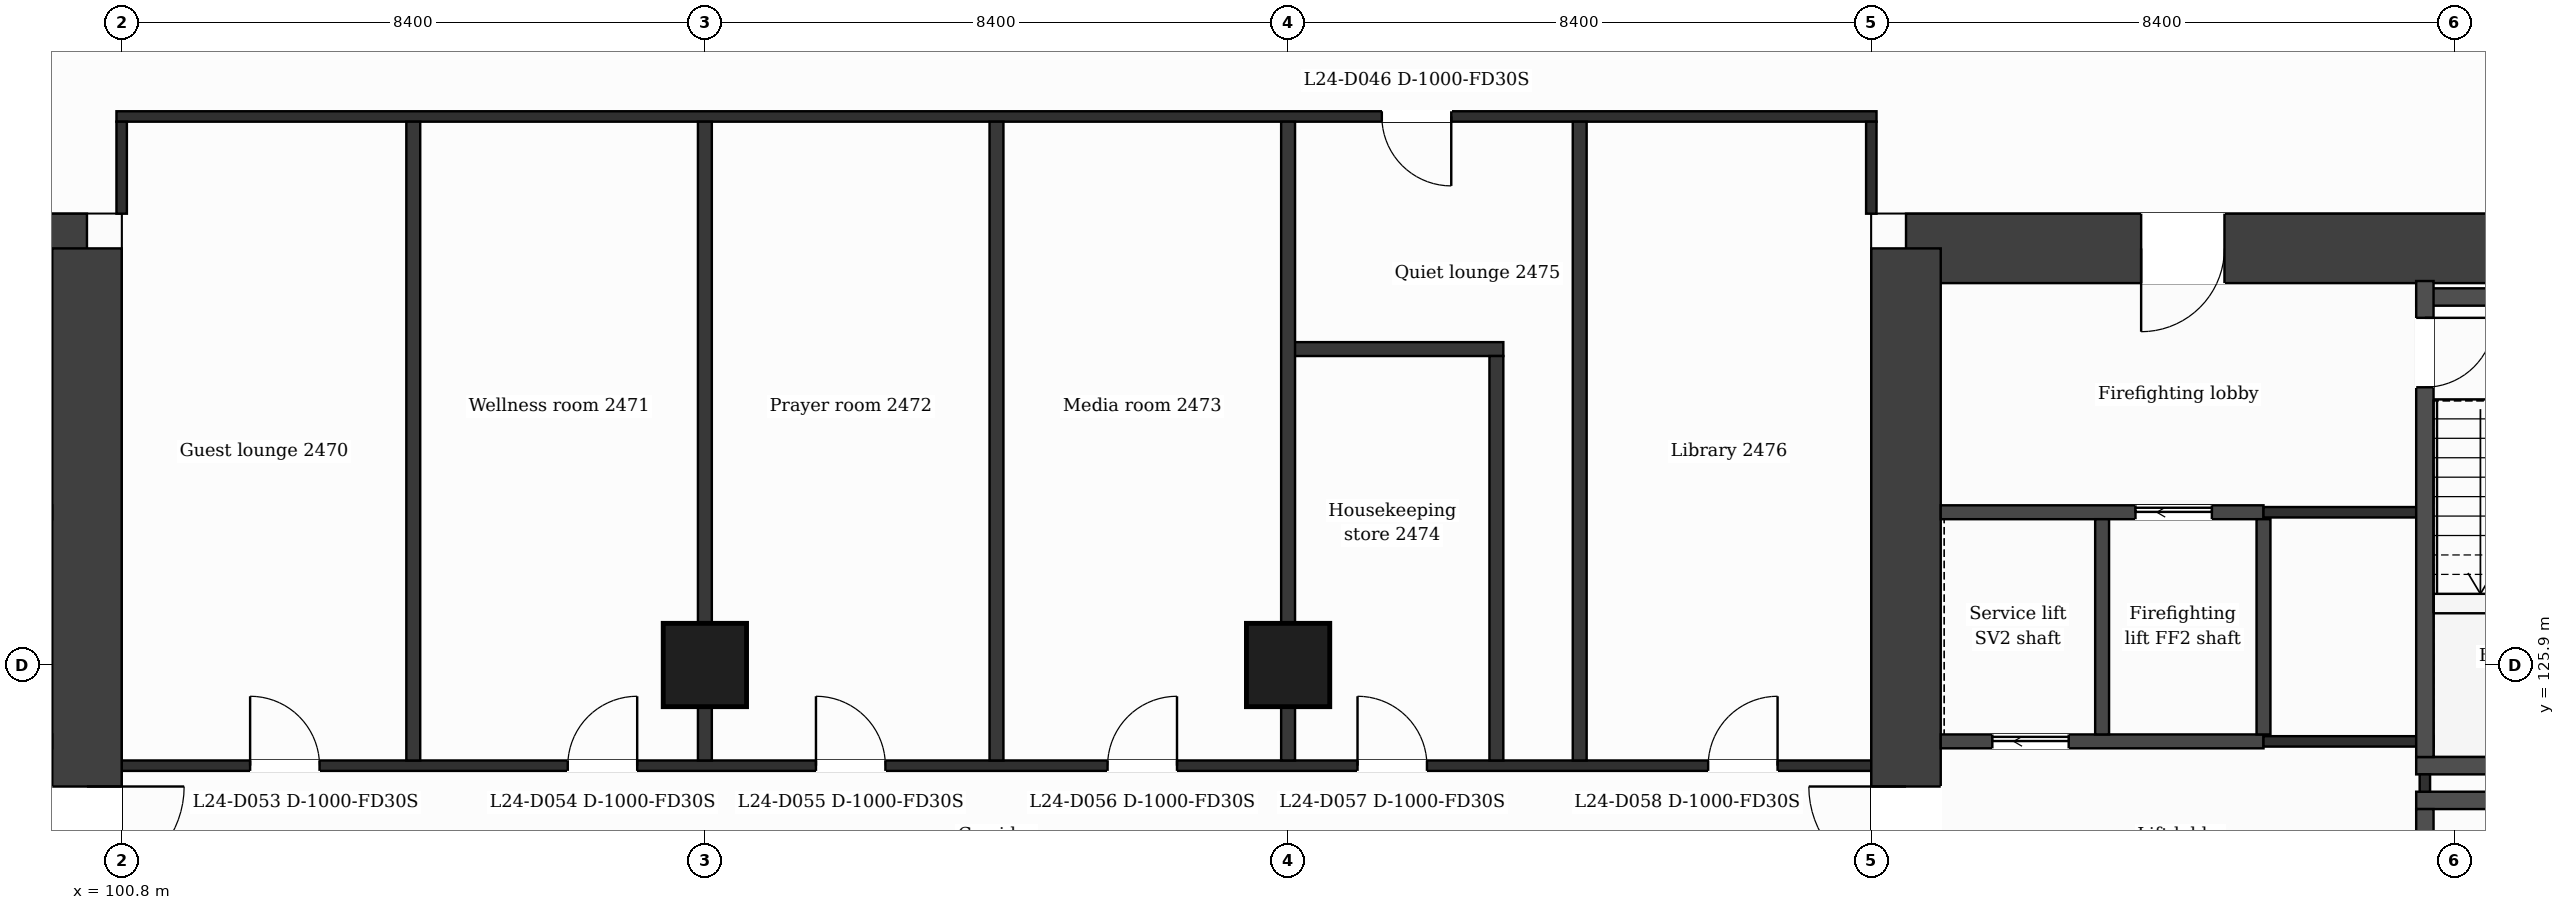
"""IFC4 building model, lengths in metres.
Left out: names, types, materials, properties, quantities, classifications, styles, units other than length and angle.
Written with IfcOpenShell. Run it as: python <this file> out.ifc"""

import sys

from ifc_helpers import new_model, si_unit, direction, frame, frame_2d, origin, origin_2d, place, context, subcontext, project, spatial, rectangle, extrude, element, fill, save


model = new_model("IFC4")
c1 = context("Model", 3, precision=1e-05, world=origin(), true_north=direction((0.0, 1.0)))
c2 = subcontext(c1, "Body", "Model", "MODEL_VIEW")
j1 = project(units=[si_unit("LENGTHUNIT", "METRE"), si_unit("PLANEANGLEUNIT", "RADIAN")], contexts=[c1])
p1 = place(None, origin())
s1 = spatial("IfcSite", under=j1, at=p1, CompositionType="ELEMENT")
p2 = place(p1, origin())
s2 = spatial("IfcBuilding", under=s1, at=p2, CompositionType="ELEMENT")
p3 = place(p2, frame((0.0, 0.0, 105.8)))
s3 = spatial("IfcBuildingStorey", under=s2, at=p3, CompositionType="ELEMENT", Elevation=105.8)
p4 = place(p3, frame((89.068, 131.9, 0.0), z_axis=(0.0, 0.0, 1.0), x_axis=(1.0, 0.0, 0.0)))
e1 = element("IfcWall", 1, at=p4, inside=s3, PredefinedType="SHEAR", context=c2, shape_type="SweptSolid", body=[
    extrude(rectangle(XDim=11.232, YDim=1.0, at=frame_2d((5.616, 0.0))), origin(), (0.0, 0.0, 1.0), 3.7),
])
p5 = place(p4, frame((6.646, 0.0, 0.0)))
e2 = element("IfcOpeningElement", 2, at=p5, cuts=e1, PredefinedType="OPENING", context=c2, shape_type="SweptSolid", body=[
    extrude(rectangle(XDim=1.2, YDim=2.1, at=frame_2d((0.6, 1.05))), frame((0.0, 0.51, 0.0), z_axis=(0.0, -1.0, 0.0), x_axis=(1.0, 0.0, 0.0)), (0.0, 0.0, 1.0), 1.02),
])
p6 = place(p3, frame((100.3, 131.9, 0.0), z_axis=(0.0, 0.0, 1.0), x_axis=(0.0, -1.0, 0.0)))
e3 = element("IfcWall", 3, at=p6, inside=s3, PredefinedType="SHEAR", context=c2, shape_type="SweptSolid", body=[
    extrude(rectangle(XDim=21.0, YDim=1.0, at=frame_2d((10.5, 0.0))), origin(), (0.0, 0.0, 1.0), 3.7),
])
p7 = place(p6, frame((7.75, 0.0, 0.0)))
e4 = element("IfcOpeningElement", 4, at=p7, cuts=e3, PredefinedType="OPENING", context=c2, shape_type="SweptSolid", body=[
    extrude(rectangle(XDim=1.4, YDim=2.1, at=frame_2d((0.7, 1.05))), frame((0.0, 0.51, 0.0), z_axis=(0.0, -1.0, 0.0), x_axis=(1.0, 0.0, 0.0)), (0.0, 0.0, 1.0), 1.02),
])
p8 = place(p3, frame((126.5, 131.9, 0.0), z_axis=(0.0, 0.0, 1.0), x_axis=(1.0, 0.0, 0.0)))
e5 = element("IfcWall", 5, at=p8, inside=s3, PredefinedType="SHEAR", context=c2, shape_type="SweptSolid", body=[
    extrude(rectangle(XDim=11.232, YDim=1.0, at=frame_2d((5.616, 0.0))), origin(), (0.0, 0.0, 1.0), 3.7),
])
p9 = place(p8, frame((3.386, 0.0, 0.0)))
e6 = element("IfcOpeningElement", 6, at=p9, cuts=e5, PredefinedType="OPENING", context=c2, shape_type="SweptSolid", body=[
    extrude(rectangle(XDim=1.2, YDim=2.1, at=frame_2d((0.6, 1.05))), frame((0.0, 0.51, 0.0), z_axis=(0.0, -1.0, 0.0), x_axis=(1.0, 0.0, 0.0)), (0.0, 0.0, 1.0), 1.02),
])
p10 = place(p3, frame((126.5, 110.9, 0.0), z_axis=(0.0, 0.0, 1.0), x_axis=(0.0, 1.0, 0.0)))
e7 = element("IfcWall", 7, at=p10, inside=s3, PredefinedType="SHEAR", context=c2, shape_type="SweptSolid", body=[
    extrude(rectangle(XDim=21.0, YDim=1.0, at=frame_2d((10.5, 0.0))), origin(), (0.0, 0.0, 1.0), 3.7),
])
p11 = place(p10, frame((11.85, 0.0, 0.0)))
e8 = element("IfcOpeningElement", 8, at=p11, cuts=e7, PredefinedType="OPENING", context=c2, shape_type="SweptSolid", body=[
    extrude(rectangle(XDim=1.4, YDim=2.1, at=frame_2d((0.7, 1.05))), frame((0.0, 0.51, 0.0), z_axis=(0.0, -1.0, 0.0), x_axis=(1.0, 0.0, 0.0)), (0.0, 0.0, 1.0), 1.02),
])
for number, where, z_axis, x_axis in (
    (9, (109.2, 125.9, 0.0), (0.0, 0.0, 1.0), (1.0, 0.0, 0.0)),
    (10, (117.6, 125.9, 0.0), (0.0, 0.0, 1.0), (1.0, 0.0, 0.0)),
):
    element("IfcColumn", number, at=place(p3, frame(where, z_axis=z_axis, x_axis=x_axis)), inside=s3, PredefinedType="COLUMN", context=c2, shape_type="SweptSolid", body=[
        extrude(rectangle(XDim=1.2, YDim=1.2, at=origin_2d()), origin(), (0.0, 0.0, 1.0), 3.7),
    ])
for number, where, z_axis, x_axis in (
    (11, (133.848, 123.95, 0.0), (0.0, 0.0, 1.0), (1.0, 0.0, 0.0)),
    (12, (133.848, 124.45, 0.0), (0.0, 0.0, 1.0), (1.0, 0.0, 0.0)),
):
    element("IfcWall", number, at=place(p3, frame(where, z_axis=z_axis, x_axis=x_axis)), inside=s3, PredefinedType="PARTITIONING", context=c2, shape_type="SweptSolid", body=[
        extrude(rectangle(XDim=3.4, YDim=0.25, at=frame_2d((1.7, 0.0))), origin(), (0.0, 0.0, 1.0), 3.38),
    ])
p12 = place(p3, frame((100.8, 124.45, 0.0), z_axis=(0.0, 0.0, 1.0), x_axis=(1.0, 0.0, 0.0)))
e13 = element("IfcWall", 13, at=p12, inside=s3, PredefinedType="PARTITIONING", context=c2, shape_type="SweptSolid", body=[
    extrude(rectangle(XDim=25.2, YDim=0.15, at=frame_2d((12.6, 0.0))), origin(), (0.0, 0.0, 1.0), 3.38),
])
p13 = place(p12, frame((1.85, 0.0, 0.0)))
e14 = element("IfcOpeningElement", 14, at=p13, cuts=e13, PredefinedType="OPENING", context=c2, shape_type="SweptSolid", body=[
    extrude(rectangle(XDim=1.0, YDim=2.1, at=frame_2d((0.5, 1.05))), frame((0.0, 0.085, 0.0), z_axis=(0.0, -1.0, 0.0), x_axis=(1.0, 0.0, 0.0)), (0.0, 0.0, 1.0), 0.17),
])
p14 = place(p12, frame((6.425, 0.0, 0.0)))
e15 = element("IfcOpeningElement", 15, at=p14, cuts=e13, PredefinedType="OPENING", context=c2, shape_type="SweptSolid", body=[
    extrude(rectangle(XDim=1.0, YDim=2.1, at=frame_2d((0.5, 1.05))), frame((0.0, 0.085, 0.0), z_axis=(0.0, -1.0, 0.0), x_axis=(1.0, 0.0, 0.0)), (0.0, 0.0, 1.0), 0.17),
])
p15 = place(p12, frame((10.0, 0.0, 0.0)))
e16 = element("IfcOpeningElement", 16, at=p15, cuts=e13, PredefinedType="OPENING", context=c2, shape_type="SweptSolid", body=[
    extrude(rectangle(XDim=1.0, YDim=2.1, at=frame_2d((0.5, 1.05))), frame((0.0, 0.085, 0.0), z_axis=(0.0, -1.0, 0.0), x_axis=(1.0, 0.0, 0.0)), (0.0, 0.0, 1.0), 0.17),
])
p16 = place(p12, frame((14.2, 0.0, 0.0)))
e17 = element("IfcOpeningElement", 17, at=p16, cuts=e13, PredefinedType="OPENING", context=c2, shape_type="SweptSolid", body=[
    extrude(rectangle(XDim=1.0, YDim=2.1, at=frame_2d((0.5, 1.05))), frame((0.0, 0.085, 0.0), z_axis=(0.0, -1.0, 0.0), x_axis=(1.0, 0.0, 0.0)), (0.0, 0.0, 1.0), 0.17),
])
p17 = place(p12, frame((17.8, 0.0, 0.0)))
e18 = element("IfcOpeningElement", 18, at=p17, cuts=e13, PredefinedType="OPENING", context=c2, shape_type="SweptSolid", body=[
    extrude(rectangle(XDim=1.0, YDim=2.1, at=frame_2d((0.5, 1.05))), frame((0.0, 0.085, 0.0), z_axis=(0.0, -1.0, 0.0), x_axis=(1.0, 0.0, 0.0)), (0.0, 0.0, 1.0), 0.17),
])
p18 = place(p12, frame((22.85, 0.0, 0.0)))
e19 = element("IfcOpeningElement", 19, at=p18, cuts=e13, PredefinedType="OPENING", context=c2, shape_type="SweptSolid", body=[
    extrude(rectangle(XDim=1.0, YDim=2.1, at=frame_2d((0.5, 1.05))), frame((0.0, 0.085, 0.0), z_axis=(0.0, -1.0, 0.0), x_axis=(1.0, 0.0, 0.0)), (0.0, 0.0, 1.0), 0.17),
])
p19 = place(p3, frame((127.0, 124.8, 0.0), z_axis=(0.0, 0.0, 1.0), x_axis=(1.0, 0.0, 0.0)))
e20 = element("IfcWall", 20, at=p19, inside=s3, PredefinedType="PARTITIONING", context=c2, shape_type="SweptSolid", body=[
    extrude(rectangle(XDim=4.649, YDim=0.2, at=frame_2d((2.324, 0.0))), origin(), (0.0, 0.0, 1.0), 3.38),
])
p20 = place(p19, frame((0.743, 0.0, 0.0)))
e21 = element("IfcOpeningElement", 21, at=p20, cuts=e20, PredefinedType="OPENING", context=c2, shape_type="SweptSolid", body=[
    extrude(rectangle(XDim=1.1, YDim=2.1, at=frame_2d((0.55, 1.05))), frame((0.0, 0.11, 0.0), z_axis=(0.0, -1.0, 0.0), x_axis=(1.0, 0.0, 0.0)), (0.0, 0.0, 1.0), 0.22),
])
p21 = place(p3, frame((131.649, 124.8, 0.0), z_axis=(0.0, 0.0, 1.0), x_axis=(1.0, 0.0, 0.0)))
e22 = element("IfcWall", 22, at=p21, inside=s3, PredefinedType="PARTITIONING", context=c2, shape_type="SweptSolid", body=[
    extrude(rectangle(XDim=2.449, YDim=0.15, at=frame_2d((1.225, 0.0))), origin(), (0.0, 0.0, 1.0), 3.38),
])
p22 = place(p3, frame((127.0, 128.1, 0.0), z_axis=(0.0, 0.0, 1.0), x_axis=(1.0, 0.0, 0.0)))
e23 = element("IfcWall", 23, at=p22, inside=s3, PredefinedType="PARTITIONING", context=c2, shape_type="SweptSolid", body=[
    extrude(rectangle(XDim=4.649, YDim=0.2, at=frame_2d((2.324, 0.0))), origin(), (0.0, 0.0, 1.0), 3.38),
])
p23 = place(p22, frame((2.805, 0.0, 0.0)))
e24 = element("IfcOpeningElement", 24, at=p23, cuts=e23, PredefinedType="OPENING", context=c2, shape_type="SweptSolid", body=[
    extrude(rectangle(XDim=1.1, YDim=2.1, at=frame_2d((0.55, 1.05))), frame((0.0, 0.11, 0.0), z_axis=(0.0, -1.0, 0.0), x_axis=(1.0, 0.0, 0.0)), (0.0, 0.0, 1.0), 0.22),
])
p24 = place(p3, frame((131.649, 128.1, 0.0), z_axis=(0.0, 0.0, 1.0), x_axis=(1.0, 0.0, 0.0)))
e25 = element("IfcWall", 25, at=p24, inside=s3, PredefinedType="PARTITIONING", context=c2, shape_type="SweptSolid", body=[
    extrude(rectangle(XDim=2.324, YDim=0.15, at=frame_2d((1.162, 0.0))), origin(), (0.0, 0.0, 1.0), 3.38),
])
p25 = place(p3, frame((117.6, 130.45, 0.0), z_axis=(0.0, 0.0, 1.0), x_axis=(1.0, 0.0, 0.0)))
e26 = element("IfcWall", 26, at=p25, inside=s3, PredefinedType="PARTITIONING", context=c2, shape_type="SweptSolid", body=[
    extrude(rectangle(XDim=3.1, YDim=0.2, at=frame_2d((1.55, 0.0))), origin(), (0.0, 0.0, 1.0), 3.38),
])
p26 = place(p3, frame((133.848, 131.2, 0.0), z_axis=(0.0, 0.0, 1.0), x_axis=(1.0, 0.0, 0.0)))
e27 = element("IfcWall", 27, at=p26, inside=s3, PredefinedType="PARTITIONING", context=c2, shape_type="SweptSolid", body=[
    extrude(rectangle(XDim=3.504, YDim=0.25, at=frame_2d((1.752, 0.0))), origin(), (0.0, 0.0, 1.0), 3.38),
])
p27 = place(p3, frame((100.725, 133.8, 0.0), z_axis=(0.0, 0.0, 1.0), x_axis=(1.0, 0.0, 0.0)))
e28 = element("IfcWall", 28, at=p27, inside=s3, PredefinedType="PARTITIONING", context=c2, shape_type="SweptSolid", body=[
    extrude(rectangle(XDim=25.35, YDim=0.15, at=frame_2d((12.675, 0.0))), origin(), (0.0, 0.0, 1.0), 3.38),
])
p28 = place(p27, frame((18.225, 0.0, 0.0)))
e29 = element("IfcOpeningElement", 29, at=p28, cuts=e28, PredefinedType="OPENING", context=c2, shape_type="SweptSolid", body=[
    extrude(rectangle(XDim=1.0, YDim=2.1, at=frame_2d((0.5, 1.05))), frame((0.0, 0.085, 0.0), z_axis=(0.0, -1.0, 0.0), x_axis=(1.0, 0.0, 0.0)), (0.0, 0.0, 1.0), 0.17),
])
p29 = place(p3, frame((100.8, 132.4, 0.0), z_axis=(0.0, 0.0, 1.0), x_axis=(0.0, 1.0, 0.0)))
e30 = element("IfcWall", 30, at=p29, inside=s3, PredefinedType="PARTITIONING", context=c2, shape_type="SweptSolid", body=[
    extrude(rectangle(XDim=1.325, YDim=0.15, at=frame_2d((0.663, 0.0))), origin(), (0.0, 0.0, 1.0), 3.38),
])
for number, where, z_axis, x_axis in (
    (31, (105.0, 124.525, 0.0), (0.0, 0.0, 1.0), (0.0, 1.0, 0.0)),
    (32, (109.2, 124.525, 0.0), (0.0, 0.0, 1.0), (0.0, 1.0, 0.0)),
    (33, (113.4, 124.525, 0.0), (0.0, 0.0, 1.0), (0.0, 1.0, 0.0)),
    (34, (117.6, 124.525, 0.0), (0.0, 0.0, 1.0), (0.0, 1.0, 0.0)),
):
    element("IfcWall", number, at=place(p3, frame(where, z_axis=z_axis, x_axis=x_axis)), inside=s3, PredefinedType="PARTITIONING", context=c2, shape_type="SweptSolid", body=[
        extrude(rectangle(XDim=9.2, YDim=0.2, at=frame_2d((4.6, 0.0))), origin(), (0.0, 0.0, 1.0), 3.38),
    ])
p30 = place(p3, frame((120.6, 124.525, 0.0), z_axis=(0.0, 0.0, 1.0), x_axis=(0.0, 1.0, 0.0)))
e35 = element("IfcWall", 35, at=p30, inside=s3, PredefinedType="PARTITIONING", context=c2, shape_type="SweptSolid", body=[
    extrude(rectangle(XDim=5.825, YDim=0.2, at=frame_2d((2.913, 0.0))), origin(), (0.0, 0.0, 1.0), 3.38),
])
p31 = place(p3, frame((121.8, 124.525, 0.0), z_axis=(0.0, 0.0, 1.0), x_axis=(0.0, 1.0, 0.0)))
e36 = element("IfcWall", 36, at=p31, inside=s3, PredefinedType="PARTITIONING", context=c2, shape_type="SweptSolid", body=[
    extrude(rectangle(XDim=9.2, YDim=0.2, at=frame_2d((4.6, 0.0))), origin(), (0.0, 0.0, 1.0), 3.38),
])
p32 = place(p3, frame((126.0, 132.4, 0.0), z_axis=(0.0, 0.0, 1.0), x_axis=(0.0, 1.0, 0.0)))
e37 = element("IfcWall", 37, at=p32, inside=s3, PredefinedType="PARTITIONING", context=c2, shape_type="SweptSolid", body=[
    extrude(rectangle(XDim=1.325, YDim=0.15, at=frame_2d((0.663, 0.0))), origin(), (0.0, 0.0, 1.0), 3.38),
])
for number, where, z_axis, x_axis in (
    (38, (129.324, 124.9, 0.0), (0.0, 0.0, 1.0), (0.0, 1.0, 0.0)),
    (39, (131.649, 124.9, 0.0), (0.0, 0.0, 1.0), (0.0, 1.0, 0.0)),
):
    element("IfcWall", number, at=place(p3, frame(where, z_axis=z_axis, x_axis=x_axis)), inside=s3, PredefinedType="PARTITIONING", context=c2, shape_type="SweptSolid", body=[
        extrude(rectangle(XDim=3.1, YDim=0.2, at=frame_2d((1.55, 0.0))), origin(), (0.0, 0.0, 1.0), 3.38),
    ])
p33 = place(p3, frame((133.973, 124.075, 0.0), z_axis=(0.0, 0.0, 1.0), x_axis=(0.0, 1.0, 0.0)))
e40 = element("IfcWall", 40, at=p33, inside=s3, PredefinedType="PARTITIONING", context=c2, shape_type="SweptSolid", body=[
    extrude(rectangle(XDim=0.25, YDim=0.15, at=frame_2d((0.125, 0.0))), origin(), (0.0, 0.0, 1.0), 3.38),
])
p34 = place(p3, frame((133.973, 116.97, 0.0), z_axis=(0.0, 0.0, 1.0), x_axis=(0.0, 1.0, 0.0)))
e41 = element("IfcWall", 41, at=p34, inside=s3, PredefinedType="PARTITIONING", context=c2, shape_type="SweptSolid", body=[
    extrude(rectangle(XDim=6.855, YDim=0.25, at=frame_2d((3.427, 0.0))), origin(), (0.0, 0.0, 1.0), 3.38),
])
p35 = place(p34, frame((5.555, 0.0, 0.0)))
e42 = element("IfcOpeningElement", 42, at=p35, cuts=e41, PredefinedType="OPENING", context=c2, shape_type="SweptSolid", body=[
    extrude(rectangle(XDim=0.95, YDim=2.1, at=frame_2d((0.475, 1.05))), frame((0.0, 0.135, 0.0), z_axis=(0.0, -1.0, 0.0), x_axis=(1.0, 0.0, 0.0)), (0.0, 0.0, 1.0), 0.27),
])
p36 = place(p3, frame((133.973, 124.575, 0.0), z_axis=(0.0, 0.0, 1.0), x_axis=(0.0, 1.0, 0.0)))
e43 = element("IfcWall", 43, at=p36, inside=s3, PredefinedType="PARTITIONING", context=c2, shape_type="SweptSolid", body=[
    extrude(rectangle(XDim=6.855, YDim=0.25, at=frame_2d((3.427, 0.0))), origin(), (0.0, 0.0, 1.0), 3.38),
])
p37 = place(p36, frame((5.325, 0.0, 0.0)))
e44 = element("IfcOpeningElement", 44, at=p37, cuts=e43, PredefinedType="OPENING", context=c2, shape_type="SweptSolid", body=[
    extrude(rectangle(XDim=1.0, YDim=2.1, at=frame_2d((0.5, 1.05))), frame((0.0, 0.135, 0.0), z_axis=(0.0, -1.0, 0.0), x_axis=(1.0, 0.0, 0.0)), (0.0, 0.0, 1.0), 0.27),
])
p38 = place(p23, origin())
e45 = element("IfcDoor", 45, at=p38, inside=s3, OperationType="SLIDING_TO_LEFT", PredefinedType="DOOR", context=c2, shape_type="SweptSolid", body=[
    extrude(rectangle(XDim=1.1, YDim=2.1, at=frame_2d((0.55, 1.05))), frame((0.0, 0.025, 0.0), z_axis=(0.0, -1.0, 0.0), x_axis=(1.0, 0.0, 0.0)), (0.0, 0.0, 1.0), 0.05),
])
fill(e24, e45)
p39 = place(p20, origin())
e46 = element("IfcDoor", 46, at=p39, inside=s3, OperationType="SLIDING_TO_LEFT", PredefinedType="DOOR", context=c2, shape_type="SweptSolid", body=[
    extrude(rectangle(XDim=1.1, YDim=2.1, at=frame_2d((0.55, 1.05))), frame((0.0, 0.025, 0.0), z_axis=(0.0, -1.0, 0.0), x_axis=(1.0, 0.0, 0.0)), (0.0, 0.0, 1.0), 0.05),
])
fill(e21, e46)
p40 = place(p37, origin())
e47 = element("IfcDoor", 47, at=p40, inside=s3, OperationType="SINGLE_SWING_RIGHT", PredefinedType="DOOR", context=c2, shape_type="SweptSolid", body=[
    extrude(rectangle(XDim=1.0, YDim=2.1, at=frame_2d((0.5, 1.05))), frame((0.0, 0.025, 0.0), z_axis=(0.0, -1.0, 0.0), x_axis=(1.0, 0.0, 0.0)), (0.0, 0.0, 1.0), 0.05),
])
fill(e44, e47)
p41 = place(p28, origin())
e48 = element("IfcDoor", 48, at=p41, inside=s3, OperationType="SINGLE_SWING_RIGHT", PredefinedType="DOOR", context=c2, shape_type="SweptSolid", body=[
    extrude(rectangle(XDim=1.0, YDim=2.1, at=frame_2d((0.5, 1.05))), frame((0.0, 0.025, 0.0), z_axis=(0.0, -1.0, 0.0), x_axis=(1.0, 0.0, 0.0)), (0.0, 0.0, 1.0), 0.05),
])
fill(e29, e48)
p42 = place(p13, origin())
e49 = element("IfcDoor", 49, at=p42, inside=s3, OperationType="SINGLE_SWING_LEFT", PredefinedType="DOOR", context=c2, shape_type="SweptSolid", body=[
    extrude(rectangle(XDim=1.0, YDim=2.1, at=frame_2d((0.5, 1.05))), frame((0.0, 0.025, 0.0), z_axis=(0.0, -1.0, 0.0), x_axis=(1.0, 0.0, 0.0)), (0.0, 0.0, 1.0), 0.05),
])
fill(e14, e49)
p43 = place(p14, origin())
e50 = element("IfcDoor", 50, at=p43, inside=s3, OperationType="SINGLE_SWING_RIGHT", PredefinedType="DOOR", context=c2, shape_type="SweptSolid", body=[
    extrude(rectangle(XDim=1.0, YDim=2.1, at=frame_2d((0.5, 1.05))), frame((0.0, 0.025, 0.0), z_axis=(0.0, -1.0, 0.0), x_axis=(1.0, 0.0, 0.0)), (0.0, 0.0, 1.0), 0.05),
])
fill(e15, e50)
p44 = place(p15, origin())
e51 = element("IfcDoor", 51, at=p44, inside=s3, OperationType="SINGLE_SWING_LEFT", PredefinedType="DOOR", context=c2, shape_type="SweptSolid", body=[
    extrude(rectangle(XDim=1.0, YDim=2.1, at=frame_2d((0.5, 1.05))), frame((0.0, 0.025, 0.0), z_axis=(0.0, -1.0, 0.0), x_axis=(1.0, 0.0, 0.0)), (0.0, 0.0, 1.0), 0.05),
])
fill(e16, e51)
p45 = place(p16, origin())
e52 = element("IfcDoor", 52, at=p45, inside=s3, OperationType="SINGLE_SWING_RIGHT", PredefinedType="DOOR", context=c2, shape_type="SweptSolid", body=[
    extrude(rectangle(XDim=1.0, YDim=2.1, at=frame_2d((0.5, 1.05))), frame((0.0, 0.025, 0.0), z_axis=(0.0, -1.0, 0.0), x_axis=(1.0, 0.0, 0.0)), (0.0, 0.0, 1.0), 0.05),
])
fill(e17, e52)
p46 = place(p17, origin())
e53 = element("IfcDoor", 53, at=p46, inside=s3, OperationType="SINGLE_SWING_LEFT", PredefinedType="DOOR", context=c2, shape_type="SweptSolid", body=[
    extrude(rectangle(XDim=1.0, YDim=2.1, at=frame_2d((0.5, 1.05))), frame((0.0, 0.025, 0.0), z_axis=(0.0, -1.0, 0.0), x_axis=(1.0, 0.0, 0.0)), (0.0, 0.0, 1.0), 0.05),
])
fill(e18, e53)
p47 = place(p18, origin())
e54 = element("IfcDoor", 54, at=p47, inside=s3, OperationType="SINGLE_SWING_RIGHT", PredefinedType="DOOR", context=c2, shape_type="SweptSolid", body=[
    extrude(rectangle(XDim=1.0, YDim=2.1, at=frame_2d((0.5, 1.05))), frame((0.0, 0.025, 0.0), z_axis=(0.0, -1.0, 0.0), x_axis=(1.0, 0.0, 0.0)), (0.0, 0.0, 1.0), 0.05),
])
fill(e19, e54)
p48 = place(p7, origin())
e55 = element("IfcDoor", 55, at=p48, inside=s3, OperationType="SINGLE_SWING_LEFT", PredefinedType="DOOR", context=c2, shape_type="SweptSolid", body=[
    extrude(rectangle(XDim=1.4, YDim=2.1, at=frame_2d((0.7, 1.05))), frame((0.0, 0.025, 0.0), z_axis=(0.0, -1.0, 0.0), x_axis=(1.0, 0.0, 0.0)), (0.0, 0.0, 1.0), 0.05),
])
fill(e4, e55)
p49 = place(p9, origin())
e56 = element("IfcDoor", 56, at=p49, inside=s3, OperationType="SINGLE_SWING_LEFT", PredefinedType="DOOR", context=c2, shape_type="SweptSolid", body=[
    extrude(rectangle(XDim=1.2, YDim=2.1, at=frame_2d((0.6, 1.05))), frame((0.0, 0.025, 0.0), z_axis=(0.0, -1.0, 0.0), x_axis=(1.0, 0.0, 0.0)), (0.0, 0.0, 1.0), 0.05),
])
fill(e6, e56)
p50 = place(p11, origin())
e57 = element("IfcDoor", 57, at=p50, inside=s3, OperationType="SINGLE_SWING_RIGHT", PredefinedType="DOOR", context=c2, shape_type="SweptSolid", body=[
    extrude(rectangle(XDim=1.4, YDim=2.1, at=frame_2d((0.7, 1.05))), frame((0.0, 0.025, 0.0), z_axis=(0.0, -1.0, 0.0), x_axis=(1.0, 0.0, 0.0)), (0.0, 0.0, 1.0), 0.05),
])
fill(e8, e57)
save(model, sys.argv[1])
